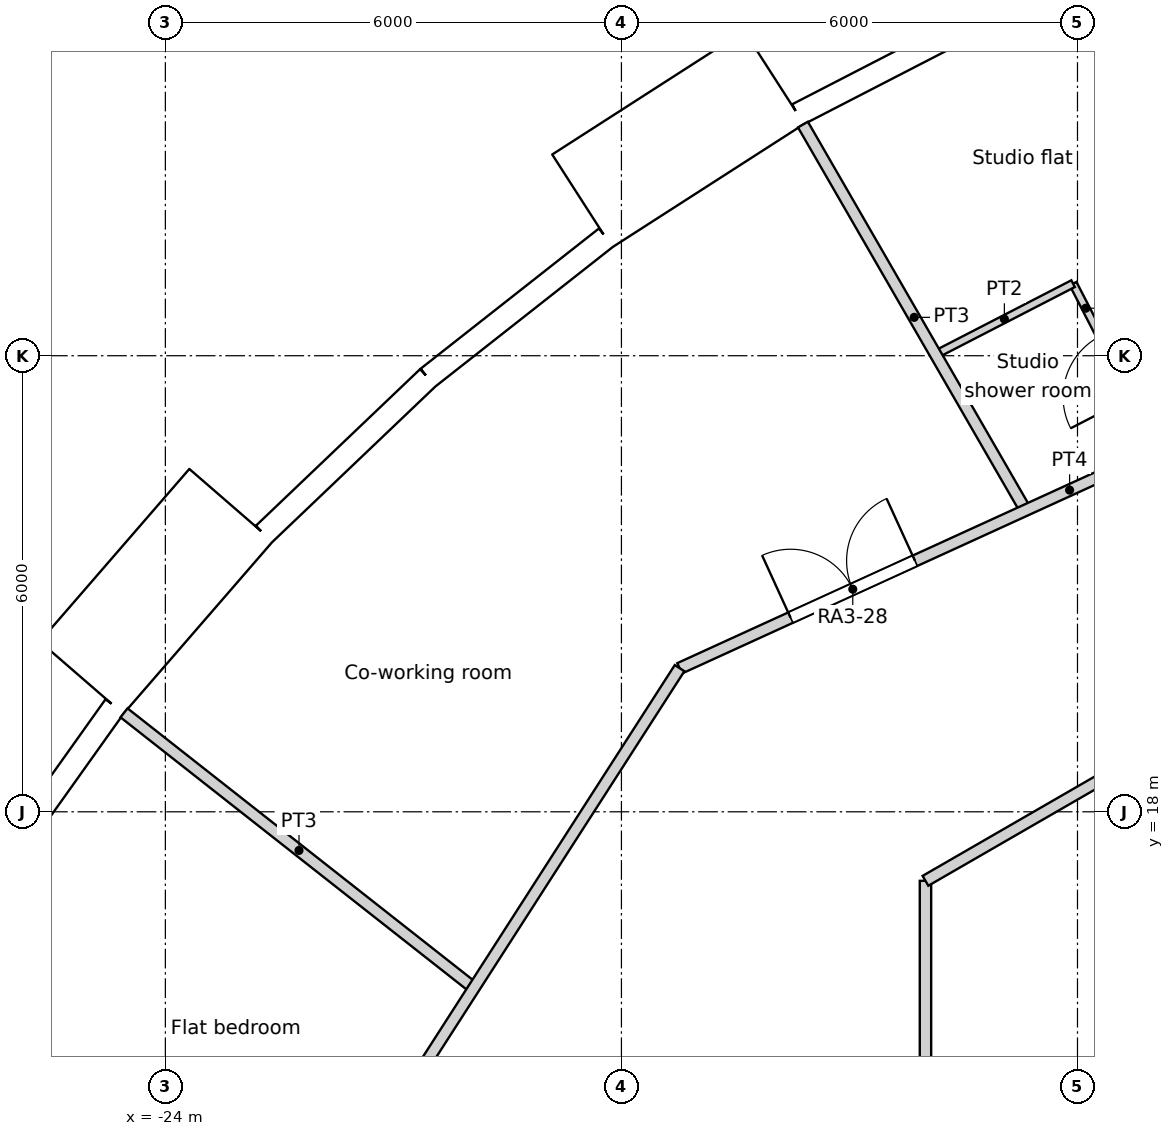
"""IFC4 building model, lengths in metres.
Left out: names, types, materials, properties, quantities, classifications, styles, units other than length and angle.
Written with IfcOpenShell. Run it as: python <this file> out.ifc"""

import sys

from ifc_helpers import new_model, si_unit, direction, frame, frame_2d, origin, origin_2d, place, context, subcontext, project, spatial, rectangle, circle, extrude, element, fill, save


model = new_model("IFC4")
c1 = context("Model", 3, precision=1e-05, world=origin(), true_north=direction((0.0, 1.0)))
c2 = subcontext(c1, "Body", "Model", "MODEL_VIEW")
j1 = project(units=[si_unit("LENGTHUNIT", "METRE"), si_unit("PLANEANGLEUNIT", "RADIAN")], contexts=[c1])
p1 = place(None, origin())
s1 = spatial("IfcSite", under=j1, at=p1, CompositionType="ELEMENT")
p2 = place(p1, origin())
s2 = spatial("IfcBuilding", under=s1, at=p2, CompositionType="ELEMENT")
p3 = place(p2, frame((0.0, 0.0, 49.8)))
s3 = spatial("IfcBuildingStorey", under=s2, at=p3, CompositionType="ELEMENT", Elevation=49.8)
for number, where, z_axis, x_axis in (
    (1, (-15.137, 26.219, 0.0), (0.0, 0.0, 1.0), (1.0, 0.0, 0.0)),
    (2, (-19.826, 22.88, 0.0), (0.0, 0.0, 1.0), (1.0, 0.0, 0.0)),
    (3, (-23.797, 18.715, 0.0), (0.0, 0.0, 1.0), (1.0, 0.0, 0.0)),
):
    element("IfcColumn", number, at=place(p3, frame(where, z_axis=z_axis, x_axis=x_axis)), inside=s3, PredefinedType="COLUMN", context=c2, shape_type="SweptSolid", body=[
        extrude(circle(Radius=0.7, at=origin_2d()), origin(), (0.0, 0.0, 1.0), 3.6),
    ])
for number, where, z_axis, x_axis in (
    (4, (-12.274, 21.259, 0.0), (0.0, 0.0, 1.0), (1.0, 0.0, 0.0)),
    (5, (-16.846, 17.855, 0.0), (0.0, 0.0, 1.0), (1.0, 0.0, 0.0)),
):
    element("IfcColumn", number, at=place(p3, frame(where, z_axis=z_axis, x_axis=x_axis)), inside=s3, PredefinedType="COLUMN", context=c2, shape_type="SweptSolid", body=[
        extrude(circle(Radius=0.75, at=origin_2d()), origin(), (0.0, 0.0, 1.0), 3.6),
    ])
p4 = place(p3, frame((-13.033, 28.539, 0.0), z_axis=(0.0, 0.0, 1.0), x_axis=(-0.888819853856, -0.458256770153, 0.0)))
e6 = element("IfcWall", 6, at=p4, inside=s3, PredefinedType="SOLIDWALL", context=c2, shape_type="SweptSolid", body=[
    extrude(rectangle(XDim=2.98, YDim=0.3, at=frame_2d((1.49, 0.0))), origin(), (0.0, 0.0, 1.0), 3.15),
])
p5 = place(p4, frame((1.49, 0.0, 1.55)))
e7 = element("IfcOpeningElement", 7, at=p5, cuts=e6, PredefinedType="OPENING", context=c2, shape_type="SweptSolid", body=[
    extrude(circle(Radius=0.9, at=origin_2d()), frame((0.0, 0.16, 0.0), z_axis=(0.0, -1.0, 0.0), x_axis=(1.0, 0.0, 0.0)), (0.0, 0.0, 1.0), 0.32),
])
p6 = place(p3, frame((-15.992, 27.659, -0.45), z_axis=(0.0, 0.0, 1.0), x_axis=(-0.841223422347, -0.540687667415, 0.0)))
e8 = element("IfcWall", 8, at=p6, inside=s3, PredefinedType="ELEMENTEDWALL", context=c2, shape_type="SweptSolid", body=[
    extrude(rectangle(XDim=3.0, YDim=1.45, at=frame_2d((1.5, 0.0))), origin(), (0.0, 0.0, 1.0), 3.6),
])
p7 = place(p6, frame((1.5, 0.0, 2.0)))
e9 = element("IfcOpeningElement", 9, at=p7, cuts=e8, PredefinedType="OPENING", context=c2, shape_type="SweptSolid", body=[
    extrude(circle(Radius=0.9, at=origin_2d()), frame((0.0, 0.735, 0.0), z_axis=(0.0, -1.0, 0.0), x_axis=(1.0, 0.0, 0.0)), (0.0, 0.0, 1.0), 1.47),
])
p8 = place(p3, frame((-18.204, 25.553, 0.0), z_axis=(0.0, 0.0, 1.0), x_axis=(-0.786045331304, -0.618168858108, 0.0)))
e10 = element("IfcWall", 10, at=p8, inside=s3, PredefinedType="SOLIDWALL", context=c2, shape_type="SweptSolid", body=[
    extrude(rectangle(XDim=2.98, YDim=0.3, at=frame_2d((1.49, 0.0))), origin(), (0.0, 0.0, 1.0), 3.15),
])
p9 = place(p8, frame((1.49, 0.0, 1.55)))
e11 = element("IfcOpeningElement", 11, at=p9, cuts=e10, PredefinedType="OPENING", context=c2, shape_type="SweptSolid", body=[
    extrude(circle(Radius=0.9, at=origin_2d()), frame((0.0, 0.16, 0.0), z_axis=(0.0, -1.0, 0.0), x_axis=(1.0, 0.0, 0.0)), (0.0, 0.0, 1.0), 0.32),
])
p10 = place(p3, frame((-20.546, 23.711, 0.0), z_axis=(0.0, 0.0, 1.0), x_axis=(-0.723744206617, -0.690068346896, 0.0)))
e12 = element("IfcWall", 12, at=p10, inside=s3, PredefinedType="SOLIDWALL", context=c2, shape_type="SweptSolid", body=[
    extrude(rectangle(XDim=2.98, YDim=0.3, at=frame_2d((1.49, 0.0))), origin(), (0.0, 0.0, 1.0), 3.15),
])
p11 = place(p10, frame((1.49, 0.0, 1.55)))
e13 = element("IfcOpeningElement", 13, at=p11, cuts=e12, PredefinedType="OPENING", context=c2, shape_type="SweptSolid", body=[
    extrude(circle(Radius=0.9, at=origin_2d()), frame((0.0, 0.16, 0.0), z_axis=(0.0, -1.0, 0.0), x_axis=(1.0, 0.0, 0.0)), (0.0, 0.0, 1.0), 0.32),
])
p12 = place(p3, frame((-23.137, 22.033, -0.45), z_axis=(0.0, 0.0, 1.0), x_axis=(-0.654890259022, -0.75572398972, 0.0)))
e14 = element("IfcWall", 14, at=p12, inside=s3, PredefinedType="ELEMENTEDWALL", context=c2, shape_type="SweptSolid", body=[
    extrude(rectangle(XDim=3.0, YDim=1.45, at=frame_2d((1.5, 0.0))), origin(), (0.0, 0.0, 1.0), 3.6),
])
p13 = place(p12, frame((1.5, 0.0, 2.0)))
e15 = element("IfcOpeningElement", 15, at=p13, cuts=e14, PredefinedType="OPENING", context=c2, shape_type="SweptSolid", body=[
    extrude(circle(Radius=0.9, at=origin_2d()), frame((0.0, 0.735, 0.0), z_axis=(0.0, -1.0, 0.0), x_axis=(1.0, 0.0, 0.0)), (0.0, 0.0, 1.0), 1.47),
])
p14 = place(p3, frame((-24.666, 19.389, 0.0), z_axis=(0.0, 0.0, 1.0), x_axis=(-0.580059407678, -0.81457417315, 0.0)))
e16 = element("IfcWall", 16, at=p14, inside=s3, PredefinedType="SOLIDWALL", context=c2, shape_type="SweptSolid", body=[
    extrude(rectangle(XDim=2.979, YDim=0.3, at=frame_2d((1.49, 0.0))), origin(), (0.0, 0.0, 1.0), 3.15),
])
p15 = place(p14, frame((1.49, 0.0, 1.55)))
e17 = element("IfcOpeningElement", 17, at=p15, cuts=e16, PredefinedType="OPENING", context=c2, shape_type="SweptSolid", body=[
    extrude(circle(Radius=0.9, at=origin_2d()), frame((0.0, 0.16, 0.0), z_axis=(0.0, -1.0, 0.0), x_axis=(1.0, 0.0, 0.0)), (0.0, 0.0, 1.0), 0.32),
])
p16 = place(p3, frame((-14.0, 17.092, 0.0), z_axis=(0.0, 0.0, 1.0), x_axis=(0.86602719091, 0.499996904595, 0.0)))
e18 = element("IfcWall", 18, at=p16, inside=s3, PredefinedType="PARTITIONING", context=c2, shape_type="SweptSolid", body=[
    extrude(rectangle(XDim=9.42, YDim=0.15, at=frame_2d((4.71, 0.0))), origin(), (0.0, 0.0, 1.0), 3.15),
])
p17 = place(p3, frame((-14.0, 11.8, 0.0), z_axis=(0.0, 0.0, 1.0), x_axis=(0.0, 1.0, 0.0)))
e19 = element("IfcWall", 19, at=p17, inside=s3, PredefinedType="PARTITIONING", context=c2, shape_type="SweptSolid", body=[
    extrude(rectangle(XDim=5.292, YDim=0.15, at=frame_2d((2.646, 0.0))), origin(), (0.0, 0.0, 1.0), 3.15),
])
p18 = place(p3, frame((-17.234, 19.888, 0.0), z_axis=(0.0, 0.0, 1.0), x_axis=(0.90953867323, 0.415619299238, 0.0)))
e20 = element("IfcWall", 20, at=p18, inside=s3, PredefinedType="PARTITIONING", context=c2, shape_type="SweptSolid", body=[
    extrude(rectangle(XDim=14.829, YDim=0.15, at=frame_2d((7.415, 0.0))), origin(), (0.0, 0.0, 1.0), 3.15),
])
p19 = place(p18, frame((12.797, 0.0, 0.0)))
e21 = element("IfcOpeningElement", 21, at=p19, cuts=e20, PredefinedType="OPENING", context=c2, shape_type="SweptSolid", body=[
    extrude(rectangle(XDim=1.0, YDim=2.1, at=frame_2d((0.5, 1.05))), frame((0.0, 0.075, 0.0), z_axis=(0.0, -1.0, 0.0), x_axis=(1.0, 0.0, 0.0)), (0.0, 0.0, 1.0), 0.15),
])
p20 = place(p18, frame((7.877, 0.0, 0.0)))
e22 = element("IfcOpeningElement", 22, at=p20, cuts=e20, PredefinedType="OPENING", context=c2, shape_type="SweptSolid", body=[
    extrude(rectangle(XDim=1.0, YDim=2.1, at=frame_2d((0.5, 1.05))), frame((0.0, 0.075, 0.0), z_axis=(0.0, -1.0, 0.0), x_axis=(1.0, 0.0, 0.0)), (0.0, 0.0, 1.0), 0.15),
])
p21 = place(p18, frame((1.604, 0.0, 0.0)))
e23 = element("IfcOpeningElement", 23, at=p21, cuts=e20, PredefinedType="OPENING", context=c2, shape_type="SweptSolid", body=[
    extrude(rectangle(XDim=1.8, YDim=2.1, at=frame_2d((0.9, 1.05))), frame((0.0, 0.075, 0.0), z_axis=(0.0, -1.0, 0.0), x_axis=(1.0, 0.0, 0.0)), (0.0, 0.0, 1.0), 0.15),
])
p22 = place(p3, frame((-25.255, 7.416, 0.0), z_axis=(0.0, 0.0, 1.0), x_axis=(0.540805851332, 0.841147449123, 0.0)))
e24 = element("IfcWall", 24, at=p22, inside=s3, PredefinedType="PARTITIONING", context=c2, shape_type="SweptSolid", body=[
    extrude(rectangle(XDim=14.829, YDim=0.15, at=frame_2d((7.415, 0.0))), origin(), (0.0, 0.0, 1.0), 3.15),
])
p23 = place(p22, frame((0.234, 0.0, 0.0)))
e25 = element("IfcOpeningElement", 25, at=p23, cuts=e24, PredefinedType="OPENING", context=c2, shape_type="SweptSolid", body=[
    extrude(rectangle(XDim=1.0, YDim=2.1, at=frame_2d((0.5, 1.05))), frame((0.0, 0.075, 0.0), z_axis=(0.0, -1.0, 0.0), x_axis=(1.0, 0.0, 0.0)), (0.0, 0.0, 1.0), 0.15),
])
p24 = place(p3, frame((-12.058, 24.948, 0.0), z_axis=(0.0, 0.0, 1.0), x_axis=(0.458287904527, -0.888803800939, 0.0)))
e26 = element("IfcWall", 26, at=p24, inside=s3, PredefinedType="PARTITIONING", context=c2, shape_type="SweptSolid", body=[
    extrude(rectangle(XDim=2.453, YDim=0.1, at=frame_2d((1.226, 0.0))), origin(), (0.0, 0.0, 1.0), 3.15),
])
p25 = place(p24, frame((0.777, 0.0, 0.0)))
e27 = element("IfcOpeningElement", 27, at=p25, cuts=e26, PredefinedType="OPENING", context=c2, shape_type="SweptSolid", body=[
    extrude(rectangle(XDim=0.9, YDim=2.04, at=frame_2d((0.45, 1.02))), frame((0.0, 0.05, 0.0), z_axis=(0.0, -1.0, 0.0), x_axis=(1.0, 0.0, 0.0)), (0.0, 0.0, 1.0), 0.1),
])
p26 = place(p3, frame((-13.866, 24.016, 0.0), z_axis=(0.0, 0.0, 1.0), x_axis=(0.888861985525, 0.45817504372, 0.0)))
e28 = element("IfcWall", 28, at=p26, inside=s3, PredefinedType="PARTITIONING", context=c2, shape_type="SweptSolid", body=[
    extrude(rectangle(XDim=2.034, YDim=0.1, at=frame_2d((1.017, 0.0))), origin(), (0.0, 0.0, 1.0), 3.15),
])
p27 = place(p3, frame((-15.612, 27.041, 0.0), z_axis=(0.0, 0.0, 1.0), x_axis=(0.499905289531, -0.866080077994, 0.0)))
e29 = element("IfcWall", 29, at=p27, inside=s3, PredefinedType="PARTITIONING", context=c2, shape_type="SweptSolid", body=[
    extrude(rectangle(XDim=5.857, YDim=0.15, at=frame_2d((2.928, 0.0))), origin(), (0.0, 0.0, 1.0), 3.15),
])
p28 = place(p3, frame((-24.544, 19.302, 0.0), z_axis=(0.0, 0.0, 1.0), x_axis=(0.786014513829, -0.618208042693, 0.0)))
e30 = element("IfcWall", 30, at=p28, inside=s3, PredefinedType="PARTITIONING", context=c2, shape_type="SweptSolid", body=[
    extrude(rectangle(XDim=5.857, YDim=0.15, at=frame_2d((2.929, 0.0))), origin(), (0.0, 0.0, 1.0), 3.15),
])
p29 = place(p5, origin())
e31 = element("IfcWindow", 31, at=p29, inside=s3, PartitioningType="SINGLE_PANEL", PredefinedType="WINDOW", context=c2, shape_type="SweptSolid", body=[
    extrude(circle(Radius=0.9, at=origin_2d()), frame((0.0, 0.12, 0.0), z_axis=(0.0, -1.0, 0.0), x_axis=(1.0, 0.0, 0.0)), (0.0, 0.0, 1.0), 0.1),
])
fill(e7, e31)
p30 = place(p7, origin())
e32 = element("IfcWindow", 32, at=p30, inside=s3, PartitioningType="SINGLE_PANEL", PredefinedType="WINDOW", context=c2, shape_type="SweptSolid", body=[
    extrude(circle(Radius=0.9, at=origin_2d()), frame((0.0, 0.695, 0.0), z_axis=(0.0, -1.0, 0.0), x_axis=(1.0, 0.0, 0.0)), (0.0, 0.0, 1.0), 0.1),
])
fill(e9, e32)
p31 = place(p9, origin())
e33 = element("IfcWindow", 33, at=p31, inside=s3, PartitioningType="SINGLE_PANEL", PredefinedType="WINDOW", context=c2, shape_type="SweptSolid", body=[
    extrude(circle(Radius=0.9, at=origin_2d()), frame((0.0, 0.12, 0.0), z_axis=(0.0, -1.0, 0.0), x_axis=(1.0, 0.0, 0.0)), (0.0, 0.0, 1.0), 0.1),
])
fill(e11, e33)
p32 = place(p11, origin())
e34 = element("IfcWindow", 34, at=p32, inside=s3, PartitioningType="SINGLE_PANEL", PredefinedType="WINDOW", context=c2, shape_type="SweptSolid", body=[
    extrude(circle(Radius=0.9, at=origin_2d()), frame((0.0, 0.12, 0.0), z_axis=(0.0, -1.0, 0.0), x_axis=(1.0, 0.0, 0.0)), (0.0, 0.0, 1.0), 0.1),
])
fill(e13, e34)
p33 = place(p13, origin())
e35 = element("IfcWindow", 35, at=p33, inside=s3, PartitioningType="SINGLE_PANEL", PredefinedType="WINDOW", context=c2, shape_type="SweptSolid", body=[
    extrude(circle(Radius=0.9, at=origin_2d()), frame((0.0, 0.695, 0.0), z_axis=(0.0, -1.0, 0.0), x_axis=(1.0, 0.0, 0.0)), (0.0, 0.0, 1.0), 0.1),
])
fill(e15, e35)
p34 = place(p15, origin())
e36 = element("IfcWindow", 36, at=p34, inside=s3, PartitioningType="SINGLE_PANEL", PredefinedType="WINDOW", context=c2, shape_type="SweptSolid", body=[
    extrude(circle(Radius=0.9, at=origin_2d()), frame((0.0, 0.12, 0.0), z_axis=(0.0, -1.0, 0.0), x_axis=(1.0, 0.0, 0.0)), (0.0, 0.0, 1.0), 0.1),
])
fill(e17, e36)
p35 = place(p21, origin())
e37 = element("IfcDoor", 37, at=p35, inside=s3, OperationType="DOUBLE_DOOR_SINGLE_SWING", PredefinedType="DOOR", context=c2, shape_type="SweptSolid", body=[
    extrude(rectangle(XDim=1.8, YDim=2.1, at=frame_2d((0.9, 1.05))), frame((0.0, 0.025, 0.0), z_axis=(0.0, -1.0, 0.0), x_axis=(1.0, 0.0, 0.0)), (0.0, 0.0, 1.0), 0.05),
])
fill(e23, e37)
save(model, sys.argv[1])
